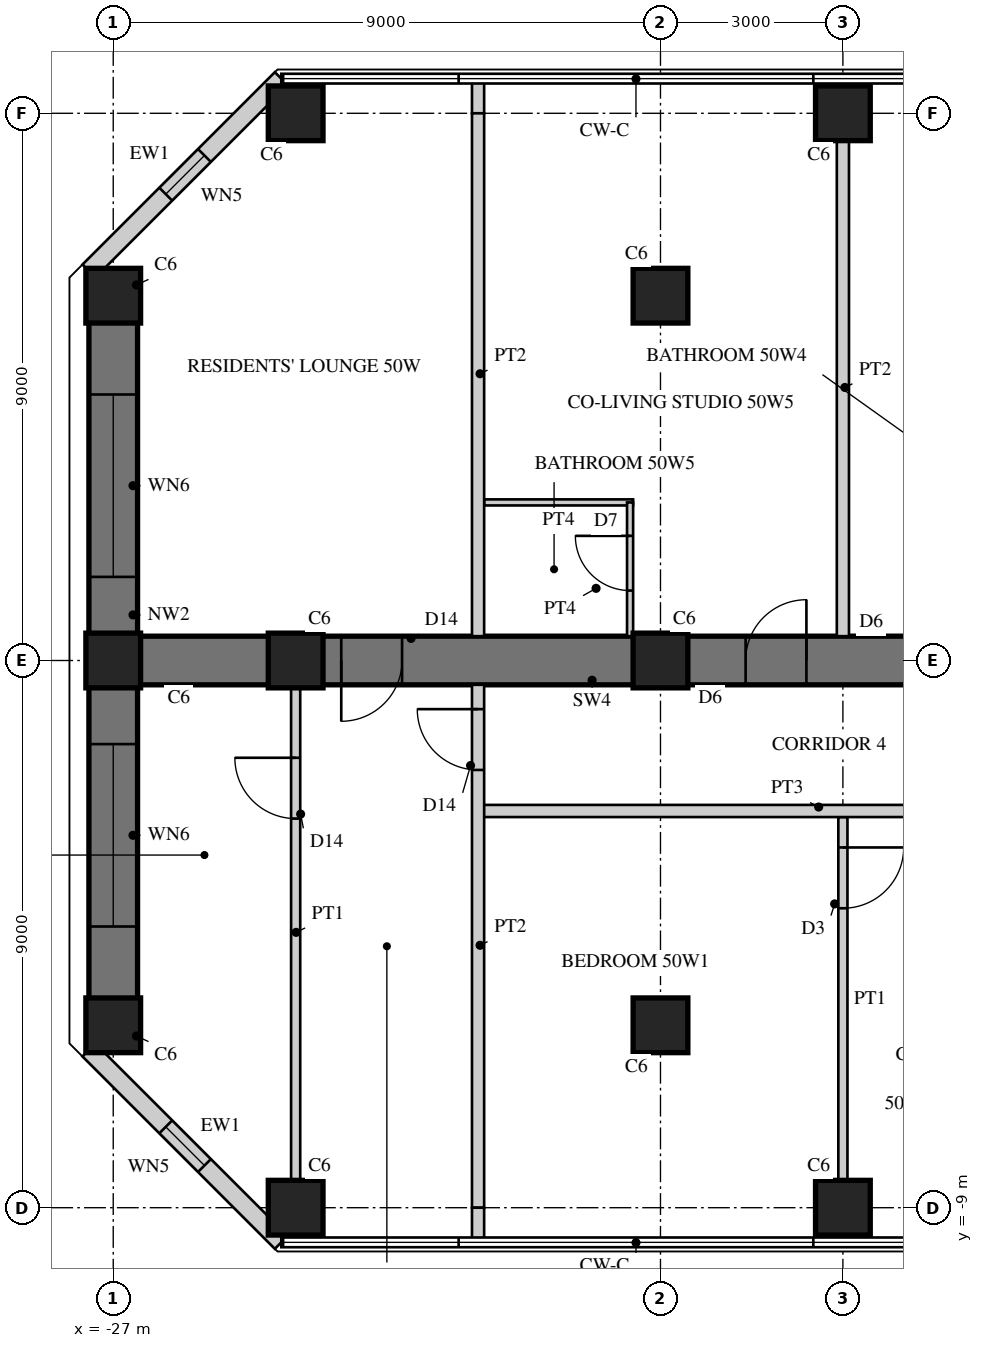
"""IFC4 building model, lengths in metres.
Left out: names, types, materials, properties, quantities, classifications, styles, units other than length and angle.
Written with IfcOpenShell. Run it as: python <this file> out.ifc"""

import sys

from ifc_helpers import new_model, si_unit, direction, frame, frame_2d, origin, origin_2d, place, context, subcontext, project, spatial, rectangle, hollow_rectangle, extrude, element, fill, save


model = new_model("IFC4")
c1 = context("Model", 3, precision=1e-05, world=origin(), true_north=direction((0.0, 1.0)))
c2 = subcontext(c1, "Body", "Model", "MODEL_VIEW")
j1 = project(units=[si_unit("LENGTHUNIT", "METRE"), si_unit("PLANEANGLEUNIT", "RADIAN")], contexts=[c1])
p1 = place(None, origin())
s1 = spatial("IfcSite", under=j1, at=p1, CompositionType="ELEMENT")
p2 = place(p1, origin())
s2 = spatial("IfcBuilding", under=s1, at=p2, CompositionType="ELEMENT")
p3 = place(p2, frame((0.0, 0.0, 200.1)))
s3 = spatial("IfcBuildingStorey", under=s2, at=p3, CompositionType="ELEMENT", Elevation=200.1)
p4 = place(p3, frame((-9.0, 0.0, 0.0), z_axis=(0.0, 0.0, 1.0), x_axis=(-1.0, 0.0, 0.0)))
e1 = element("IfcWall", 1, at=p4, inside=s3, PredefinedType="SHEAR", context=c2, shape_type="SweptSolid", body=[
    extrude(rectangle(XDim=18.0, YDim=0.8, at=frame_2d((9.0, 0.0))), origin(), (0.0, 0.0, 1.0), 3.4),
])
p5 = place(p4, frame((3.95, 0.0, 0.0)))
e2 = element("IfcOpeningElement", 2, at=p5, cuts=e1, PredefinedType="OPENING", context=c2, shape_type="SweptSolid", body=[
    extrude(rectangle(XDim=1.0, YDim=2.15, at=frame_2d((0.5, 1.075))), frame((0.0, 0.41, 0.0), z_axis=(0.0, -1.0, 0.0), x_axis=(1.0, 0.0, 0.0)), (0.0, 0.0, 1.0), 0.82),
])
p6 = place(p4, frame((6.6, 0.0, 0.0)))
e3 = element("IfcOpeningElement", 3, at=p6, cuts=e1, PredefinedType="OPENING", context=c2, shape_type="SweptSolid", body=[
    extrude(rectangle(XDim=1.0, YDim=2.15, at=frame_2d((0.5, 1.075))), frame((0.0, 0.41, 0.0), z_axis=(0.0, -1.0, 0.0), x_axis=(1.0, 0.0, 0.0)), (0.0, 0.0, 1.0), 0.82),
])
p7 = place(p4, frame((13.25, 0.0, 0.0)))
e4 = element("IfcOpeningElement", 4, at=p7, cuts=e1, PredefinedType="OPENING", context=c2, shape_type="SweptSolid", body=[
    extrude(rectangle(XDim=1.0, YDim=2.2, at=frame_2d((0.5, 1.1))), frame((0.0, 0.41, 0.0), z_axis=(0.0, -1.0, 0.0), x_axis=(1.0, 0.0, 0.0)), (0.0, 0.0, 1.0), 0.82),
])
p8 = place(p3, frame((-27.0, 6.0, 0.0), z_axis=(0.0, 0.0, 1.0), x_axis=(0.0, -1.0, 0.0)))
e5 = element("IfcWall", 5, at=p8, inside=s3, PredefinedType="SHEAR", context=c2, shape_type="SweptSolid", body=[
    extrude(rectangle(XDim=12.0, YDim=0.8, at=frame_2d((6.0, 0.0))), origin(), (0.0, 0.0, 1.0), 3.4),
])
p9 = place(p8, frame((1.625, 0.0, 0.6)))
e6 = element("IfcOpeningElement", 6, at=p9, cuts=e5, PredefinedType="OPENING", context=c2, shape_type="SweptSolid", body=[
    extrude(rectangle(XDim=3.0, YDim=2.4, at=frame_2d((1.5, 1.2))), frame((0.0, 0.41, 0.0), z_axis=(0.0, -1.0, 0.0), x_axis=(1.0, 0.0, 0.0)), (0.0, 0.0, 1.0), 0.82),
])
p10 = place(p8, frame((7.375, 0.0, 0.6)))
e7 = element("IfcOpeningElement", 7, at=p10, cuts=e5, PredefinedType="OPENING", context=c2, shape_type="SweptSolid", body=[
    extrude(rectangle(XDim=3.0, YDim=2.4, at=frame_2d((1.5, 1.2))), frame((0.0, 0.41, 0.0), z_axis=(0.0, -1.0, 0.0), x_axis=(1.0, 0.0, 0.0)), (0.0, 0.0, 1.0), 0.82),
])
for number, where, z_axis, x_axis in (
    (8, (-15.0, 9.0, 0.0), (0.0, 0.0, 1.0), (1.0, 0.0, 0.0)),
    (9, (-24.0, 9.0, 0.0), (0.0, 0.0, 1.0), (1.0, 0.0, 0.0)),
    (10, (-15.0, -9.0, 0.0), (0.0, 0.0, 1.0), (1.0, 0.0, 0.0)),
    (11, (-24.0, -9.0, 0.0), (0.0, 0.0, 1.0), (1.0, 0.0, 0.0)),
    (12, (-27.0, 6.0, 0.0), (0.0, 0.0, 1.0), (1.0, 0.0, 0.0)),
    (13, (-27.0, 0.0, 0.0), (0.0, 0.0, 1.0), (1.0, 0.0, 0.0)),
    (14, (-27.0, -6.0, 0.0), (0.0, 0.0, 1.0), (1.0, 0.0, 0.0)),
    (15, (-18.0, 6.0, 0.0), (0.0, 0.0, 1.0), (1.0, 0.0, 0.0)),
    (16, (-18.0, 0.0, 0.0), (0.0, 0.0, 1.0), (1.0, 0.0, 0.0)),
    (17, (-18.0, -6.0, 0.0), (0.0, 0.0, 1.0), (1.0, 0.0, 0.0)),
    (18, (-24.0, 0.0, 0.0), (0.0, 0.0, 1.0), (1.0, 0.0, 0.0)),
):
    element("IfcColumn", number, at=place(p3, frame(where, z_axis=z_axis, x_axis=x_axis)), inside=s3, PredefinedType="COLUMN", context=c2, shape_type="SweptSolid", body=[
        extrude(rectangle(XDim=0.9, YDim=0.9, at=origin_2d()), origin(), (0.0, 0.0, 1.0), 3.4),
    ])
p11 = place(p3, frame((-24.236, 9.57, 0.0), z_axis=(0.0, 0.0, 1.0), x_axis=(-0.707079499254, -0.707134062067, 0.0)))
e19 = element("IfcWall", 19, at=p11, inside=s3, PredefinedType="SOLIDWALL", context=c2, shape_type="SweptSolid", body=[
    extrude(rectangle(XDim=4.475, YDim=0.3, at=frame_2d((2.237, 0.0))), origin(), (0.0, 0.0, 1.0), 3.22),
])
p12 = place(p11, frame((1.787, 0.0, 0.3)))
e20 = element("IfcOpeningElement", 20, at=p12, cuts=e19, PredefinedType="OPENING", context=c2, shape_type="SweptSolid", body=[
    extrude(rectangle(XDim=0.9, YDim=2.4, at=frame_2d((0.45, 1.2))), frame((0.0, 0.16, 0.0), z_axis=(0.0, -1.0, 0.0), x_axis=(1.0, 0.0, 0.0)), (0.0, 0.0, 1.0), 0.32),
])
p13 = place(p3, frame((-27.4, -6.406, 0.0), z_axis=(0.0, 0.0, 1.0), x_axis=(0.707079499254, -0.707134062067, 0.0)))
e21 = element("IfcWall", 21, at=p13, inside=s3, PredefinedType="SOLIDWALL", context=c2, shape_type="SweptSolid", body=[
    extrude(rectangle(XDim=4.475, YDim=0.3, at=frame_2d((2.237, 0.0))), origin(), (0.0, 0.0, 1.0), 3.22),
])
p14 = place(p13, frame((1.787, 0.0, 0.3)))
e22 = element("IfcOpeningElement", 22, at=p14, cuts=e21, PredefinedType="OPENING", context=c2, shape_type="SweptSolid", body=[
    extrude(rectangle(XDim=0.9, YDim=2.4, at=frame_2d((0.45, 1.2))), frame((0.0, 0.16, 0.0), z_axis=(0.0, -1.0, 0.0), x_axis=(1.0, 0.0, 0.0)), (0.0, 0.0, 1.0), 0.32),
])
p15 = place(p3, frame((-15.0, -2.575, 0.0), z_axis=(0.0, 0.0, 1.0), x_axis=(0.0, -1.0, 0.0)))
e23 = element("IfcWall", 23, at=p15, inside=s3, PredefinedType="PARTITIONING", context=c2, shape_type="SweptSolid", body=[
    extrude(rectangle(XDim=5.975, YDim=0.15, at=frame_2d((2.988, 0.0))), origin(), (0.0, 0.0, 1.0), 2.47),
])
p16 = place(p15, frame((0.5, 0.0, 0.0)))
e24 = element("IfcOpeningElement", 24, at=p16, cuts=e23, PredefinedType="OPENING", context=c2, shape_type="SweptSolid", body=[
    extrude(rectangle(XDim=1.0, YDim=2.1, at=frame_2d((0.5, 1.05))), frame((0.0, 0.085, 0.0), z_axis=(0.0, -1.0, 0.0), x_axis=(1.0, 0.0, 0.0)), (0.0, 0.0, 1.0), 0.17),
])
p17 = place(p3, frame((-15.0, 8.55, 0.0), z_axis=(0.0, 0.0, 1.0), x_axis=(0.0, -1.0, 0.0)))
e25 = element("IfcWall", 25, at=p17, inside=s3, PredefinedType="SOLIDWALL", context=c2, shape_type="SweptSolid", body=[
    extrude(rectangle(XDim=8.15, YDim=0.2, at=frame_2d((4.075, 0.0))), origin(), (0.0, 0.0, 1.0), 2.47),
])
p18 = place(p3, frame((-18.45, 2.6, 0.0), z_axis=(0.0, 0.0, 1.0), x_axis=(-1.0, 0.0, 0.0)))
e26 = element("IfcWall", 26, at=p18, inside=s3, PredefinedType="PARTITIONING", context=c2, shape_type="SweptSolid", body=[
    extrude(rectangle(XDim=2.45, YDim=0.1, at=frame_2d((1.225, 0.0))), origin(), (0.0, 0.0, 1.0), 3.22),
])
p19 = place(p3, frame((-18.5, 2.6, 0.0), z_axis=(0.0, 0.0, 1.0), x_axis=(0.0, -1.0, 0.0)))
e27 = element("IfcWall", 27, at=p19, inside=s3, PredefinedType="PARTITIONING", context=c2, shape_type="SweptSolid", body=[
    extrude(rectangle(XDim=2.2, YDim=0.1, at=frame_2d((1.1, 0.0))), origin(), (0.0, 0.0, 1.0), 3.22),
])
p20 = place(p19, frame((0.55, 0.0, 0.0)))
e28 = element("IfcOpeningElement", 28, at=p20, cuts=e27, PredefinedType="OPENING", context=c2, shape_type="SweptSolid", body=[
    extrude(rectangle(XDim=0.9, YDim=2.1, at=frame_2d((0.45, 1.05))), frame((0.0, 0.06, 0.0), z_axis=(0.0, -1.0, 0.0), x_axis=(1.0, 0.0, 0.0)), (0.0, 0.0, 1.0), 0.12),
])
p21 = place(p3, frame((-9.55, -2.475, 0.0), z_axis=(0.0, 0.0, 1.0), x_axis=(-1.0, 0.0, 0.0)))
e29 = element("IfcWall", 29, at=p21, inside=s3, PredefinedType="SOLIDWALL", context=c2, shape_type="SweptSolid", body=[
    extrude(rectangle(XDim=11.45, YDim=0.2, at=frame_2d((5.725, 0.0))), origin(), (0.0, 0.0, 1.0), 3.22),
])
p22 = place(p21, frame((3.4, 0.0, 0.0)))
e30 = element("IfcOpeningElement", 30, at=p22, cuts=e29, PredefinedType="OPENING", context=c2, shape_type="SweptSolid", body=[
    extrude(rectangle(XDim=1.0, YDim=2.15, at=frame_2d((0.5, 1.075))), frame((0.0, 0.11, 0.0), z_axis=(0.0, -1.0, 0.0), x_axis=(1.0, 0.0, 0.0)), (0.0, 0.0, 1.0), 0.22),
])
p23 = place(p3, frame((-24.0, -0.4, 0.0), z_axis=(0.0, 0.0, 1.0), x_axis=(0.0, -1.0, 0.0)))
e31 = element("IfcWall", 31, at=p23, inside=s3, PredefinedType="PARTITIONING", context=c2, shape_type="SweptSolid", body=[
    extrude(rectangle(XDim=8.15, YDim=0.15, at=frame_2d((4.075, 0.0))), origin(), (0.0, 0.0, 1.0), 2.47),
])
p24 = place(p23, frame((1.2, 0.0, 0.0)))
e32 = element("IfcOpeningElement", 32, at=p24, cuts=e31, PredefinedType="OPENING", context=c2, shape_type="SweptSolid", body=[
    extrude(rectangle(XDim=1.0, YDim=2.2, at=frame_2d((0.5, 1.1))), frame((0.0, 0.085, 0.0), z_axis=(0.0, -1.0, 0.0), x_axis=(1.0, 0.0, 0.0)), (0.0, 0.0, 1.0), 0.17),
])
p25 = place(p3, frame((-21.0, 9.53, 0.0), z_axis=(0.0, 0.0, 1.0), x_axis=(0.0, -1.0, 0.0)))
e33 = element("IfcWall", 33, at=p25, inside=s3, PredefinedType="SOLIDWALL", context=c2, shape_type="SweptSolid", body=[
    extrude(rectangle(XDim=0.53, YDim=0.2, at=frame_2d((0.265, 0.0))), origin(), (0.0, 0.0, 1.0), 3.22),
])
p26 = place(p3, frame((-21.0, 9.0, 0.0), z_axis=(0.0, 0.0, 1.0), x_axis=(0.0, -1.0, 0.0)))
e34 = element("IfcWall", 34, at=p26, inside=s3, PredefinedType="SOLIDWALL", context=c2, shape_type="SweptSolid", body=[
    extrude(rectangle(XDim=8.6, YDim=0.2, at=frame_2d((4.3, 0.0))), origin(), (0.0, 0.0, 1.0), 2.62),
])
p27 = place(p3, frame((-21.0, -0.4, 0.0), z_axis=(0.0, 0.0, 1.0), x_axis=(0.0, -1.0, 0.0)))
e35 = element("IfcWall", 35, at=p27, inside=s3, PredefinedType="SOLIDWALL", context=c2, shape_type="SweptSolid", body=[
    extrude(rectangle(XDim=8.6, YDim=0.2, at=frame_2d((4.3, 0.0))), origin(), (0.0, 0.0, 1.0), 2.62),
])
p28 = place(p27, frame((0.4, 0.0, 0.0)))
e36 = element("IfcOpeningElement", 36, at=p28, cuts=e35, PredefinedType="OPENING", context=c2, shape_type="SweptSolid", body=[
    extrude(rectangle(XDim=1.0, YDim=2.2, at=frame_2d((0.5, 1.1))), frame((0.0, 0.11, 0.0), z_axis=(0.0, -1.0, 0.0), x_axis=(1.0, 0.0, 0.0)), (0.0, 0.0, 1.0), 0.22),
])
p29 = place(p3, frame((-21.0, -9.0, 0.0), z_axis=(0.0, 0.0, 1.0), x_axis=(0.0, -1.0, 0.0)))
e37 = element("IfcWall", 37, at=p29, inside=s3, PredefinedType="SOLIDWALL", context=c2, shape_type="SweptSolid", body=[
    extrude(rectangle(XDim=0.53, YDim=0.2, at=frame_2d((0.265, 0.0))), origin(), (0.0, 0.0, 1.0), 3.22),
])
p30 = place(p12, origin())
e38 = element("IfcWindow", 38, at=p30, inside=s3, PartitioningType="SINGLE_PANEL", PredefinedType="WINDOW", context=c2, shape_type="SweptSolid", body=[
    extrude(hollow_rectangle(XDim=0.9, YDim=2.4, WallThickness=0.06, at=frame_2d((0.45, 1.2))), frame((0.0, 0.03, 0.0), z_axis=(0.0, -1.0, 0.0), x_axis=(1.0, 0.0, 0.0)), (0.0, 0.0, 1.0), 0.06),
    extrude(rectangle(XDim=0.779, YDim=2.279, at=frame_2d((0.45, 1.2))), frame((0.0, 0.03, 0.0), z_axis=(0.0, -1.0, 0.0), x_axis=(1.0, 0.0, 0.0)), (0.0, 0.0, 1.0), 0.06),
])
fill(e20, e38)
p31 = place(p9, origin())
e39 = element("IfcWindow", 39, at=p31, inside=s3, PartitioningType="SINGLE_PANEL", PredefinedType="WINDOW", context=c2, shape_type="SweptSolid", body=[
    extrude(hollow_rectangle(XDim=3.0, YDim=2.4, WallThickness=0.06, at=frame_2d((1.5, 1.2))), frame((0.0, 0.03, 0.0), z_axis=(0.0, -1.0, 0.0), x_axis=(1.0, 0.0, 0.0)), (0.0, 0.0, 1.0), 0.06),
    extrude(rectangle(XDim=2.879, YDim=2.279, at=frame_2d((1.5, 1.2))), frame((0.0, 0.03, 0.0), z_axis=(0.0, -1.0, 0.0), x_axis=(1.0, 0.0, 0.0)), (0.0, 0.0, 1.0), 0.06),
])
fill(e6, e39)
p32 = place(p10, origin())
e40 = element("IfcWindow", 40, at=p32, inside=s3, PartitioningType="SINGLE_PANEL", PredefinedType="WINDOW", context=c2, shape_type="SweptSolid", body=[
    extrude(hollow_rectangle(XDim=3.0, YDim=2.4, WallThickness=0.06, at=frame_2d((1.5, 1.2))), frame((0.0, 0.03, 0.0), z_axis=(0.0, -1.0, 0.0), x_axis=(1.0, 0.0, 0.0)), (0.0, 0.0, 1.0), 0.06),
    extrude(rectangle(XDim=2.879, YDim=2.279, at=frame_2d((1.5, 1.2))), frame((0.0, 0.03, 0.0), z_axis=(0.0, -1.0, 0.0), x_axis=(1.0, 0.0, 0.0)), (0.0, 0.0, 1.0), 0.06),
])
fill(e7, e40)
p33 = place(p14, origin())
e41 = element("IfcWindow", 41, at=p33, inside=s3, PartitioningType="SINGLE_PANEL", PredefinedType="WINDOW", context=c2, shape_type="SweptSolid", body=[
    extrude(hollow_rectangle(XDim=0.9, YDim=2.4, WallThickness=0.06, at=frame_2d((0.45, 1.2))), frame((0.0, 0.03, 0.0), z_axis=(0.0, -1.0, 0.0), x_axis=(1.0, 0.0, 0.0)), (0.0, 0.0, 1.0), 0.06),
    extrude(rectangle(XDim=0.779, YDim=2.279, at=frame_2d((0.45, 1.2))), frame((0.0, 0.03, 0.0), z_axis=(0.0, -1.0, 0.0), x_axis=(1.0, 0.0, 0.0)), (0.0, 0.0, 1.0), 0.06),
])
fill(e22, e41)
p34 = place(p16, origin())
e42 = element("IfcDoor", 42, at=p34, inside=s3, OperationType="SINGLE_SWING_LEFT", PredefinedType="DOOR", context=c2, shape_type="SweptSolid", body=[
    extrude(rectangle(XDim=1.0, YDim=2.1, at=frame_2d((0.5, 1.05))), frame((0.0, 0.025, 0.0), z_axis=(0.0, -1.0, 0.0), x_axis=(1.0, 0.0, 0.0)), (0.0, 0.0, 1.0), 0.05),
])
fill(e24, e42)
p35 = place(p20, frame((0.9, 0.0, 0.0), z_axis=(0.0, 0.0, 1.0), x_axis=(-1.0, 0.0, 0.0)))
e43 = element("IfcDoor", 43, at=p35, inside=s3, OperationType="SINGLE_SWING_RIGHT", PredefinedType="DOOR", context=c2, shape_type="SweptSolid", body=[
    extrude(rectangle(XDim=0.9, YDim=2.1, at=frame_2d((0.45, 1.05))), frame((0.0, 0.025, 0.0), z_axis=(0.0, -1.0, 0.0), x_axis=(1.0, 0.0, 0.0)), (0.0, 0.0, 1.0), 0.05),
])
fill(e28, e43)
p36 = place(p24, frame((1.0, 0.0, 0.0), z_axis=(0.0, 0.0, 1.0), x_axis=(-1.0, 0.0, 0.0)))
e44 = element("IfcDoor", 44, at=p36, inside=s3, OperationType="SINGLE_SWING_RIGHT", PredefinedType="DOOR", context=c2, shape_type="SweptSolid", body=[
    extrude(rectangle(XDim=1.0, YDim=2.2, at=frame_2d((0.5, 1.1))), frame((0.0, 0.025, 0.0), z_axis=(0.0, -1.0, 0.0), x_axis=(1.0, 0.0, 0.0)), (0.0, 0.0, 1.0), 0.05),
])
fill(e32, e44)
p37 = place(p28, frame((1.0, 0.0, 0.0), z_axis=(0.0, 0.0, 1.0), x_axis=(-1.0, 0.0, 0.0)))
e45 = element("IfcDoor", 45, at=p37, inside=s3, OperationType="SINGLE_SWING_RIGHT", PredefinedType="DOOR", context=c2, shape_type="SweptSolid", body=[
    extrude(rectangle(XDim=1.0, YDim=2.2, at=frame_2d((0.5, 1.1))), frame((0.0, 0.025, 0.0), z_axis=(0.0, -1.0, 0.0), x_axis=(1.0, 0.0, 0.0)), (0.0, 0.0, 1.0), 0.05),
])
fill(e36, e45)
p38 = place(p6, frame((1.0, 0.0, 0.0), z_axis=(0.0, 0.0, 1.0), x_axis=(-1.0, 0.0, 0.0)))
e46 = element("IfcDoor", 46, at=p38, inside=s3, OperationType="SINGLE_SWING_RIGHT", PredefinedType="DOOR", context=c2, shape_type="SweptSolid", body=[
    extrude(rectangle(XDim=1.0, YDim=2.15, at=frame_2d((0.5, 1.075))), frame((0.0, 0.025, 0.0), z_axis=(0.0, -1.0, 0.0), x_axis=(1.0, 0.0, 0.0)), (0.0, 0.0, 1.0), 0.05),
])
fill(e3, e46)
p39 = place(p7, origin())
e47 = element("IfcDoor", 47, at=p39, inside=s3, OperationType="SINGLE_SWING_RIGHT", PredefinedType="DOOR", context=c2, shape_type="SweptSolid", body=[
    extrude(rectangle(XDim=1.0, YDim=2.2, at=frame_2d((0.5, 1.1))), frame((0.0, 0.025, 0.0), z_axis=(0.0, -1.0, 0.0), x_axis=(1.0, 0.0, 0.0)), (0.0, 0.0, 1.0), 0.05),
])
fill(e4, e47)
save(model, sys.argv[1])
